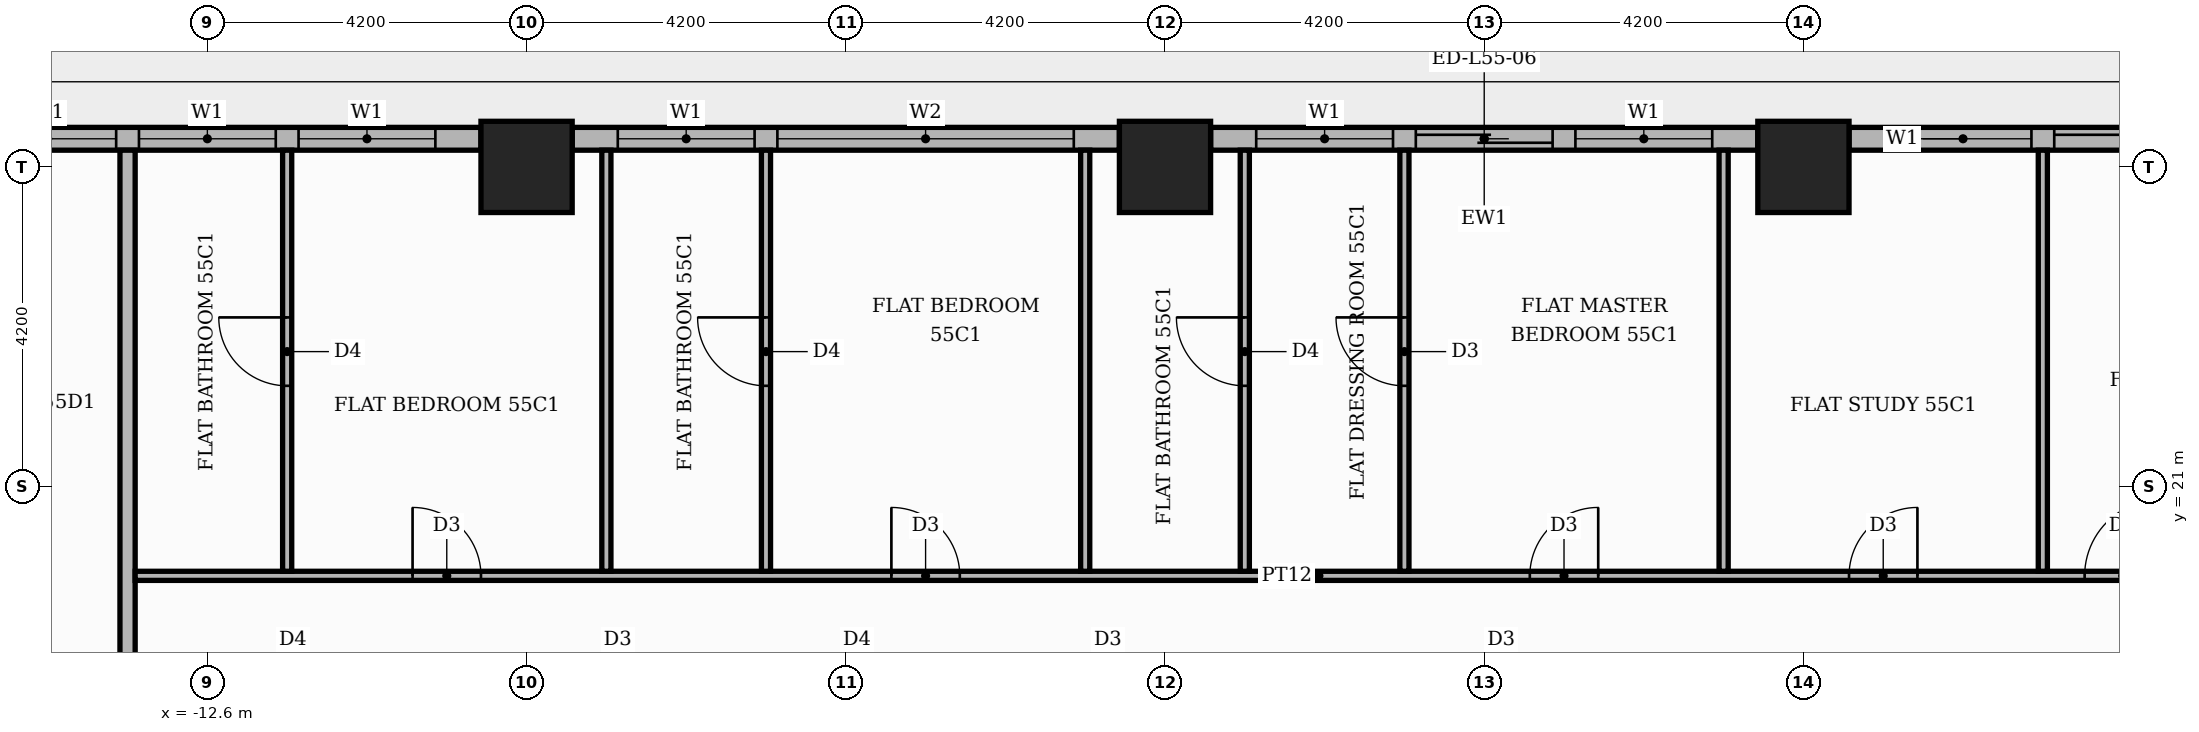
"""IFC4 building model, lengths in metres.
Left out: names, types, materials, properties, quantities, classifications, styles, units other than length and angle.
Written with IfcOpenShell. Run it as: python <this file> out.ifc"""

import sys

from ifc_helpers import new_model, si_unit, direction, frame, frame_2d, origin, origin_2d, place, context, subcontext, project, spatial, rectangle, extrude, element, fill, save


model = new_model("IFC4")
c1 = context("Model", 3, precision=1e-05, world=origin(), true_north=direction((0.0, 1.0)))
c2 = subcontext(c1, "Body", "Model", "MODEL_VIEW")
j1 = project(units=[si_unit("LENGTHUNIT", "METRE"), si_unit("PLANEANGLEUNIT", "RADIAN")], contexts=[c1])
p1 = place(None, origin())
s1 = spatial("IfcSite", under=j1, at=p1, CompositionType="ELEMENT")
p2 = place(p1, origin())
s2 = spatial("IfcBuilding", under=s1, at=p2, CompositionType="ELEMENT")
p3 = place(p2, frame((0.0, 0.0, 231.3)))
s3 = spatial("IfcBuildingStorey", under=s2, at=p3, CompositionType="ELEMENT", Elevation=231.3)
for number, where, z_axis, x_axis in (
    (1, (0.0, 25.2, 0.0), (0.0, 0.0, 1.0), (1.0, 0.0, 0.0)),
    (2, (-8.4, 25.2, 0.0), (0.0, 0.0, 1.0), (1.0, 0.0, 0.0)),
    (3, (8.4, 25.2, 0.0), (0.0, 0.0, 1.0), (1.0, 0.0, 0.0)),
):
    element("IfcColumn", number, at=place(p3, frame(where, z_axis=z_axis, x_axis=x_axis)), inside=s3, PredefinedType="COLUMN", context=c2, shape_type="SweptSolid", body=[
        extrude(rectangle(XDim=1.2, YDim=1.2, at=origin_2d()), origin(), (0.0, 0.0, 1.0), 3.9),
    ])
p4 = place(p3, frame((16.2, 25.57, 0.0), z_axis=(0.0, 0.0, 1.0), x_axis=(-1.0, 0.0, 0.0)))
e4 = element("IfcWall", 4, at=p4, inside=s3, PredefinedType="STANDARD", context=c2, shape_type="SweptSolid", body=[
    extrude(rectangle(XDim=7.2, YDim=0.3, at=frame_2d((3.6, 0.0))), origin(), (0.0, 0.0, 1.0), 3.4),
])
p5 = place(p4, frame((0.6, 0.0, 0.0)))
e5 = element("IfcOpeningElement", 5, at=p5, cuts=e4, PredefinedType="OPENING", context=c2, shape_type="SweptSolid", body=[
    extrude(rectangle(XDim=3.9, YDim=2.4, at=frame_2d((1.95, 1.2))), frame((0.0, 0.16, 0.0), z_axis=(0.0, -1.0, 0.0), x_axis=(1.0, 0.0, 0.0)), (0.0, 0.0, 1.0), 0.32),
])
p6 = place(p4, frame((4.8, 0.0, 0.9)))
e6 = element("IfcOpeningElement", 6, at=p6, cuts=e4, PredefinedType="OPENING", context=c2, shape_type="SweptSolid", body=[
    extrude(rectangle(XDim=1.8, YDim=2.1, at=frame_2d((0.9, 1.05))), frame((0.0, 0.16, 0.0), z_axis=(0.0, -1.0, 0.0), x_axis=(1.0, 0.0, 0.0)), (0.0, 0.0, 1.0), 0.32),
])
p7 = place(p3, frame((7.8, 25.57, 0.0), z_axis=(0.0, 0.0, 1.0), x_axis=(-1.0, 0.0, 0.0)))
e7 = element("IfcWall", 7, at=p7, inside=s3, PredefinedType="STANDARD", context=c2, shape_type="SweptSolid", body=[
    extrude(rectangle(XDim=7.2, YDim=0.3, at=frame_2d((3.6, 0.0))), origin(), (0.0, 0.0, 1.0), 3.4),
])
p8 = place(p7, frame((0.6, 0.0, 0.9)))
e8 = element("IfcOpeningElement", 8, at=p8, cuts=e7, PredefinedType="OPENING", context=c2, shape_type="SweptSolid", body=[
    extrude(rectangle(XDim=1.8, YDim=2.1, at=frame_2d((0.9, 1.05))), frame((0.0, 0.16, 0.0), z_axis=(0.0, -1.0, 0.0), x_axis=(1.0, 0.0, 0.0)), (0.0, 0.0, 1.0), 0.32),
])
p9 = place(p7, frame((2.7, 0.0, 0.0)))
e9 = element("IfcOpeningElement", 9, at=p9, cuts=e7, PredefinedType="OPENING", context=c2, shape_type="SweptSolid", body=[
    extrude(rectangle(XDim=1.8, YDim=2.4, at=frame_2d((0.9, 1.2))), frame((0.0, 0.16, 0.0), z_axis=(0.0, -1.0, 0.0), x_axis=(1.0, 0.0, 0.0)), (0.0, 0.0, 1.0), 0.32),
])
p10 = place(p7, frame((4.8, 0.0, 0.9)))
e10 = element("IfcOpeningElement", 10, at=p10, cuts=e7, PredefinedType="OPENING", context=c2, shape_type="SweptSolid", body=[
    extrude(rectangle(XDim=1.8, YDim=2.1, at=frame_2d((0.9, 1.05))), frame((0.0, 0.16, 0.0), z_axis=(0.0, -1.0, 0.0), x_axis=(1.0, 0.0, 0.0)), (0.0, 0.0, 1.0), 0.32),
])
p11 = place(p3, frame((-0.6, 25.57, 0.0), z_axis=(0.0, 0.0, 1.0), x_axis=(-1.0, 0.0, 0.0)))
e11 = element("IfcWall", 11, at=p11, inside=s3, PredefinedType="STANDARD", context=c2, shape_type="SweptSolid", body=[
    extrude(rectangle(XDim=7.2, YDim=0.3, at=frame_2d((3.6, 0.0))), origin(), (0.0, 0.0, 1.0), 3.4),
])
p12 = place(p11, frame((0.6, 0.0, 0.9)))
e12 = element("IfcOpeningElement", 12, at=p12, cuts=e11, PredefinedType="OPENING", context=c2, shape_type="SweptSolid", body=[
    extrude(rectangle(XDim=3.9, YDim=2.1, at=frame_2d((1.95, 1.05))), frame((0.0, 0.16, 0.0), z_axis=(0.0, -1.0, 0.0), x_axis=(1.0, 0.0, 0.0)), (0.0, 0.0, 1.0), 0.32),
])
p13 = place(p11, frame((4.8, 0.0, 0.9)))
e13 = element("IfcOpeningElement", 13, at=p13, cuts=e11, PredefinedType="OPENING", context=c2, shape_type="SweptSolid", body=[
    extrude(rectangle(XDim=1.8, YDim=2.1, at=frame_2d((0.9, 1.05))), frame((0.0, 0.16, 0.0), z_axis=(0.0, -1.0, 0.0), x_axis=(1.0, 0.0, 0.0)), (0.0, 0.0, 1.0), 0.32),
])
p14 = place(p3, frame((-9.0, 25.57, 0.0), z_axis=(0.0, 0.0, 1.0), x_axis=(-1.0, 0.0, 0.0)))
e14 = element("IfcWall", 14, at=p14, inside=s3, PredefinedType="STANDARD", context=c2, shape_type="SweptSolid", body=[
    extrude(rectangle(XDim=7.2, YDim=0.3, at=frame_2d((3.6, 0.0))), origin(), (0.0, 0.0, 1.0), 3.4),
])
p15 = place(p14, frame((0.6, 0.0, 0.9)))
e15 = element("IfcOpeningElement", 15, at=p15, cuts=e14, PredefinedType="OPENING", context=c2, shape_type="SweptSolid", body=[
    extrude(rectangle(XDim=1.8, YDim=2.1, at=frame_2d((0.9, 1.05))), frame((0.0, 0.16, 0.0), z_axis=(0.0, -1.0, 0.0), x_axis=(1.0, 0.0, 0.0)), (0.0, 0.0, 1.0), 0.32),
])
p16 = place(p14, frame((2.7, 0.0, 0.9)))
e16 = element("IfcOpeningElement", 16, at=p16, cuts=e14, PredefinedType="OPENING", context=c2, shape_type="SweptSolid", body=[
    extrude(rectangle(XDim=1.8, YDim=2.1, at=frame_2d((0.9, 1.05))), frame((0.0, 0.16, 0.0), z_axis=(0.0, -1.0, 0.0), x_axis=(1.0, 0.0, 0.0)), (0.0, 0.0, 1.0), 0.32),
])
p17 = place(p14, frame((4.8, 0.0, 0.9)))
e17 = element("IfcOpeningElement", 17, at=p17, cuts=e14, PredefinedType="OPENING", context=c2, shape_type="SweptSolid", body=[
    extrude(rectangle(XDim=1.8, YDim=2.1, at=frame_2d((0.9, 1.05))), frame((0.0, 0.16, 0.0), z_axis=(0.0, -1.0, 0.0), x_axis=(1.0, 0.0, 0.0)), (0.0, 0.0, 1.0), 0.32),
])
p18 = place(p3, frame((-13.65, 13.75, 0.0), z_axis=(0.0, 0.0, 1.0), x_axis=(0.0, 1.0, 0.0)))
e18 = element("IfcWall", 18, at=p18, inside=s3, PredefinedType="PARTITIONING", context=c2, shape_type="SweptSolid", body=[
    extrude(rectangle(XDim=11.67, YDim=0.2, at=frame_2d((5.835, 0.0))), origin(), (0.0, 0.0, 1.0), 3.4),
])
p19 = place(p3, frame((-13.55, 19.82, 0.0), z_axis=(0.0, 0.0, 1.0), x_axis=(1.0, 0.0, 0.0)))
e19 = element("IfcWall", 19, at=p19, inside=s3, PredefinedType="PARTITIONING", context=c2, shape_type="SweptSolid", body=[
    extrude(rectangle(XDim=31.15, YDim=0.12, at=frame_2d((15.575, 0.0))), origin(), (0.0, 0.0, 1.0), 3.4),
])
p20 = place(p19, frame((25.65, 0.0, 0.0)))
e20 = element("IfcOpeningElement", 20, at=p20, cuts=e19, PredefinedType="OPENING", context=c2, shape_type="SweptSolid", body=[
    extrude(rectangle(XDim=1.0, YDim=2.1, at=frame_2d((0.5, 1.05))), frame((0.0, 0.07, 0.0), z_axis=(0.0, -1.0, 0.0), x_axis=(1.0, 0.0, 0.0)), (0.0, 0.0, 1.0), 0.14),
])
p21 = place(p19, frame((22.55, 0.0, 0.0)))
e21 = element("IfcOpeningElement", 21, at=p21, cuts=e19, PredefinedType="OPENING", context=c2, shape_type="SweptSolid", body=[
    extrude(rectangle(XDim=0.9, YDim=2.1, at=frame_2d((0.45, 1.05))), frame((0.0, 0.07, 0.0), z_axis=(0.0, -1.0, 0.0), x_axis=(1.0, 0.0, 0.0)), (0.0, 0.0, 1.0), 0.14),
])
p22 = place(p19, frame((18.35, 0.0, 0.0)))
e22 = element("IfcOpeningElement", 22, at=p22, cuts=e19, PredefinedType="OPENING", context=c2, shape_type="SweptSolid", body=[
    extrude(rectangle(XDim=0.9, YDim=2.1, at=frame_2d((0.45, 1.05))), frame((0.0, 0.07, 0.0), z_axis=(0.0, -1.0, 0.0), x_axis=(1.0, 0.0, 0.0)), (0.0, 0.0, 1.0), 0.14),
])
p23 = place(p19, frame((9.95, 0.0, 0.0)))
e23 = element("IfcOpeningElement", 23, at=p23, cuts=e19, PredefinedType="OPENING", context=c2, shape_type="SweptSolid", body=[
    extrude(rectangle(XDim=0.9, YDim=2.1, at=frame_2d((0.45, 1.05))), frame((0.0, 0.07, 0.0), z_axis=(0.0, -1.0, 0.0), x_axis=(1.0, 0.0, 0.0)), (0.0, 0.0, 1.0), 0.14),
])
p24 = place(p19, frame((3.65, 0.0, 0.0)))
e24 = element("IfcOpeningElement", 24, at=p24, cuts=e19, PredefinedType="OPENING", context=c2, shape_type="SweptSolid", body=[
    extrude(rectangle(XDim=0.9, YDim=2.1, at=frame_2d((0.45, 1.05))), frame((0.0, 0.07, 0.0), z_axis=(0.0, -1.0, 0.0), x_axis=(1.0, 0.0, 0.0)), (0.0, 0.0, 1.0), 0.14),
])
p25 = place(p3, frame((-11.55, 19.88, 0.0), z_axis=(0.0, 0.0, 1.0), x_axis=(0.0, 1.0, 0.0)))
e25 = element("IfcWall", 25, at=p25, inside=s3, PredefinedType="PARTITIONING", context=c2, shape_type="SweptSolid", body=[
    extrude(rectangle(XDim=5.54, YDim=0.12, at=frame_2d((2.77, 0.0))), origin(), (0.0, 0.0, 1.0), 3.4),
])
p26 = place(p25, frame((2.44, 0.0, 0.0)))
e26 = element("IfcOpeningElement", 26, at=p26, cuts=e25, PredefinedType="OPENING", context=c2, shape_type="SweptSolid", body=[
    extrude(rectangle(XDim=0.9, YDim=2.1, at=frame_2d((0.45, 1.05))), frame((0.0, 0.07, 0.0), z_axis=(0.0, -1.0, 0.0), x_axis=(1.0, 0.0, 0.0)), (0.0, 0.0, 1.0), 0.14),
])
p27 = place(p3, frame((-7.35, 19.88, 0.0), z_axis=(0.0, 0.0, 1.0), x_axis=(0.0, 1.0, 0.0)))
e27 = element("IfcWall", 27, at=p27, inside=s3, PredefinedType="PARTITIONING", context=c2, shape_type="SweptSolid", body=[
    extrude(rectangle(XDim=5.54, YDim=0.12, at=frame_2d((2.77, 0.0))), origin(), (0.0, 0.0, 1.0), 3.4),
])
p28 = place(p3, frame((-5.25, 19.88, 0.0), z_axis=(0.0, 0.0, 1.0), x_axis=(0.0, 1.0, 0.0)))
e28 = element("IfcWall", 28, at=p28, inside=s3, PredefinedType="PARTITIONING", context=c2, shape_type="SweptSolid", body=[
    extrude(rectangle(XDim=5.54, YDim=0.12, at=frame_2d((2.77, 0.0))), origin(), (0.0, 0.0, 1.0), 3.4),
])
p29 = place(p28, frame((2.44, 0.0, 0.0)))
e29 = element("IfcOpeningElement", 29, at=p29, cuts=e28, PredefinedType="OPENING", context=c2, shape_type="SweptSolid", body=[
    extrude(rectangle(XDim=0.9, YDim=2.1, at=frame_2d((0.45, 1.05))), frame((0.0, 0.07, 0.0), z_axis=(0.0, -1.0, 0.0), x_axis=(1.0, 0.0, 0.0)), (0.0, 0.0, 1.0), 0.14),
])
p30 = place(p3, frame((-1.05, 19.88, 0.0), z_axis=(0.0, 0.0, 1.0), x_axis=(0.0, 1.0, 0.0)))
e30 = element("IfcWall", 30, at=p30, inside=s3, PredefinedType="PARTITIONING", context=c2, shape_type="SweptSolid", body=[
    extrude(rectangle(XDim=5.54, YDim=0.12, at=frame_2d((2.77, 0.0))), origin(), (0.0, 0.0, 1.0), 3.4),
])
p31 = place(p3, frame((1.05, 19.88, 0.0), z_axis=(0.0, 0.0, 1.0), x_axis=(0.0, 1.0, 0.0)))
e31 = element("IfcWall", 31, at=p31, inside=s3, PredefinedType="PARTITIONING", context=c2, shape_type="SweptSolid", body=[
    extrude(rectangle(XDim=5.54, YDim=0.12, at=frame_2d((2.77, 0.0))), origin(), (0.0, 0.0, 1.0), 3.4),
])
p32 = place(p31, frame((2.44, 0.0, 0.0)))
e32 = element("IfcOpeningElement", 32, at=p32, cuts=e31, PredefinedType="OPENING", context=c2, shape_type="SweptSolid", body=[
    extrude(rectangle(XDim=0.9, YDim=2.1, at=frame_2d((0.45, 1.05))), frame((0.0, 0.07, 0.0), z_axis=(0.0, -1.0, 0.0), x_axis=(1.0, 0.0, 0.0)), (0.0, 0.0, 1.0), 0.14),
])
p33 = place(p3, frame((3.15, 19.88, 0.0), z_axis=(0.0, 0.0, 1.0), x_axis=(0.0, 1.0, 0.0)))
e33 = element("IfcWall", 33, at=p33, inside=s3, PredefinedType="PARTITIONING", context=c2, shape_type="SweptSolid", body=[
    extrude(rectangle(XDim=5.54, YDim=0.12, at=frame_2d((2.77, 0.0))), origin(), (0.0, 0.0, 1.0), 3.4),
])
p34 = place(p33, frame((2.44, 0.0, 0.0)))
e34 = element("IfcOpeningElement", 34, at=p34, cuts=e33, PredefinedType="OPENING", context=c2, shape_type="SweptSolid", body=[
    extrude(rectangle(XDim=0.9, YDim=2.1, at=frame_2d((0.45, 1.05))), frame((0.0, 0.07, 0.0), z_axis=(0.0, -1.0, 0.0), x_axis=(1.0, 0.0, 0.0)), (0.0, 0.0, 1.0), 0.14),
])
for number, where, z_axis, x_axis in (
    (35, (7.35, 19.88, 0.0), (0.0, 0.0, 1.0), (0.0, 1.0, 0.0)),
    (36, (11.55, 19.88, 0.0), (0.0, 0.0, 1.0), (0.0, 1.0, 0.0)),
):
    element("IfcWall", number, at=place(p3, frame(where, z_axis=z_axis, x_axis=x_axis)), inside=s3, PredefinedType="PARTITIONING", context=c2, shape_type="SweptSolid", body=[
        extrude(rectangle(XDim=5.54, YDim=0.12, at=frame_2d((2.77, 0.0))), origin(), (0.0, 0.0, 1.0), 3.4),
    ])
p35 = place(p5, origin())
e37 = element("IfcDoor", 37, at=p35, inside=s3, OperationType="SLIDING_TO_LEFT", PredefinedType="DOOR", context=c2, shape_type="SweptSolid", body=[
    extrude(rectangle(XDim=3.9, YDim=2.4, at=frame_2d((1.95, 1.2))), frame((0.0, 0.025, 0.0), z_axis=(0.0, -1.0, 0.0), x_axis=(1.0, 0.0, 0.0)), (0.0, 0.0, 1.0), 0.05),
])
fill(e5, e37)
p36 = place(p6, origin())
e38 = element("IfcWindow", 38, at=p36, inside=s3, PartitioningType="SINGLE_PANEL", PredefinedType="WINDOW", context=c2, shape_type="SweptSolid", body=[
    extrude(rectangle(XDim=1.8, YDim=2.1, at=frame_2d((0.9, 1.05))), frame((0.0, 0.03, 0.0), z_axis=(0.0, -1.0, 0.0), x_axis=(1.0, 0.0, 0.0)), (0.0, 0.0, 1.0), 0.06),
])
fill(e6, e38)
p37 = place(p8, origin())
e39 = element("IfcWindow", 39, at=p37, inside=s3, PartitioningType="SINGLE_PANEL", PredefinedType="WINDOW", context=c2, shape_type="SweptSolid", body=[
    extrude(rectangle(XDim=1.8, YDim=2.1, at=frame_2d((0.9, 1.05))), frame((0.0, 0.03, 0.0), z_axis=(0.0, -1.0, 0.0), x_axis=(1.0, 0.0, 0.0)), (0.0, 0.0, 1.0), 0.06),
])
fill(e8, e39)
p38 = place(p9, origin())
e40 = element("IfcDoor", 40, at=p38, inside=s3, OperationType="SLIDING_TO_LEFT", PredefinedType="DOOR", context=c2, shape_type="SweptSolid", body=[
    extrude(rectangle(XDim=1.8, YDim=2.4, at=frame_2d((0.9, 1.2))), frame((0.0, 0.025, 0.0), z_axis=(0.0, -1.0, 0.0), x_axis=(1.0, 0.0, 0.0)), (0.0, 0.0, 1.0), 0.05),
])
fill(e9, e40)
p39 = place(p10, origin())
e41 = element("IfcWindow", 41, at=p39, inside=s3, PartitioningType="SINGLE_PANEL", PredefinedType="WINDOW", context=c2, shape_type="SweptSolid", body=[
    extrude(rectangle(XDim=1.8, YDim=2.1, at=frame_2d((0.9, 1.05))), frame((0.0, 0.03, 0.0), z_axis=(0.0, -1.0, 0.0), x_axis=(1.0, 0.0, 0.0)), (0.0, 0.0, 1.0), 0.06),
])
fill(e10, e41)
p40 = place(p12, origin())
e42 = element("IfcWindow", 42, at=p40, inside=s3, PartitioningType="SINGLE_PANEL", PredefinedType="WINDOW", context=c2, shape_type="SweptSolid", body=[
    extrude(rectangle(XDim=3.9, YDim=2.1, at=frame_2d((1.95, 1.05))), frame((0.0, 0.03, 0.0), z_axis=(0.0, -1.0, 0.0), x_axis=(1.0, 0.0, 0.0)), (0.0, 0.0, 1.0), 0.06),
])
fill(e12, e42)
p41 = place(p13, origin())
e43 = element("IfcWindow", 43, at=p41, inside=s3, PartitioningType="SINGLE_PANEL", PredefinedType="WINDOW", context=c2, shape_type="SweptSolid", body=[
    extrude(rectangle(XDim=1.8, YDim=2.1, at=frame_2d((0.9, 1.05))), frame((0.0, 0.03, 0.0), z_axis=(0.0, -1.0, 0.0), x_axis=(1.0, 0.0, 0.0)), (0.0, 0.0, 1.0), 0.06),
])
fill(e13, e43)
p42 = place(p15, origin())
e44 = element("IfcWindow", 44, at=p42, inside=s3, PartitioningType="SINGLE_PANEL", PredefinedType="WINDOW", context=c2, shape_type="SweptSolid", body=[
    extrude(rectangle(XDim=1.8, YDim=2.1, at=frame_2d((0.9, 1.05))), frame((0.0, 0.03, 0.0), z_axis=(0.0, -1.0, 0.0), x_axis=(1.0, 0.0, 0.0)), (0.0, 0.0, 1.0), 0.06),
])
fill(e15, e44)
p43 = place(p16, origin())
e45 = element("IfcWindow", 45, at=p43, inside=s3, PartitioningType="SINGLE_PANEL", PredefinedType="WINDOW", context=c2, shape_type="SweptSolid", body=[
    extrude(rectangle(XDim=1.8, YDim=2.1, at=frame_2d((0.9, 1.05))), frame((0.0, 0.03, 0.0), z_axis=(0.0, -1.0, 0.0), x_axis=(1.0, 0.0, 0.0)), (0.0, 0.0, 1.0), 0.06),
])
fill(e16, e45)
p44 = place(p17, origin())
e46 = element("IfcWindow", 46, at=p44, inside=s3, PartitioningType="SINGLE_PANEL", PredefinedType="WINDOW", context=c2, shape_type="SweptSolid", body=[
    extrude(rectangle(XDim=1.8, YDim=2.1, at=frame_2d((0.9, 1.05))), frame((0.0, 0.03, 0.0), z_axis=(0.0, -1.0, 0.0), x_axis=(1.0, 0.0, 0.0)), (0.0, 0.0, 1.0), 0.06),
])
fill(e17, e46)
p45 = place(p20, origin())
e47 = element("IfcDoor", 47, at=p45, inside=s3, OperationType="SINGLE_SWING_RIGHT", PredefinedType="DOOR", context=c2, shape_type="SweptSolid", body=[
    extrude(rectangle(XDim=1.0, YDim=2.1, at=frame_2d((0.5, 1.05))), frame((0.0, 0.025, 0.0), z_axis=(0.0, -1.0, 0.0), x_axis=(1.0, 0.0, 0.0)), (0.0, 0.0, 1.0), 0.05),
])
fill(e20, e47)
p46 = place(p21, origin())
e48 = element("IfcDoor", 48, at=p46, inside=s3, OperationType="SINGLE_SWING_RIGHT", PredefinedType="DOOR", context=c2, shape_type="SweptSolid", body=[
    extrude(rectangle(XDim=0.9, YDim=2.1, at=frame_2d((0.45, 1.05))), frame((0.0, 0.025, 0.0), z_axis=(0.0, -1.0, 0.0), x_axis=(1.0, 0.0, 0.0)), (0.0, 0.0, 1.0), 0.05),
])
fill(e21, e48)
p47 = place(p22, origin())
e49 = element("IfcDoor", 49, at=p47, inside=s3, OperationType="SINGLE_SWING_RIGHT", PredefinedType="DOOR", context=c2, shape_type="SweptSolid", body=[
    extrude(rectangle(XDim=0.9, YDim=2.1, at=frame_2d((0.45, 1.05))), frame((0.0, 0.025, 0.0), z_axis=(0.0, -1.0, 0.0), x_axis=(1.0, 0.0, 0.0)), (0.0, 0.0, 1.0), 0.05),
])
fill(e22, e49)
p48 = place(p34, origin())
e50 = element("IfcDoor", 50, at=p48, inside=s3, OperationType="SINGLE_SWING_RIGHT", PredefinedType="DOOR", context=c2, shape_type="SweptSolid", body=[
    extrude(rectangle(XDim=0.9, YDim=2.1, at=frame_2d((0.45, 1.05))), frame((0.0, 0.025, 0.0), z_axis=(0.0, -1.0, 0.0), x_axis=(1.0, 0.0, 0.0)), (0.0, 0.0, 1.0), 0.05),
])
fill(e34, e50)
p49 = place(p32, origin())
e51 = element("IfcDoor", 51, at=p49, inside=s3, OperationType="SINGLE_SWING_RIGHT", PredefinedType="DOOR", context=c2, shape_type="SweptSolid", body=[
    extrude(rectangle(XDim=0.9, YDim=2.1, at=frame_2d((0.45, 1.05))), frame((0.0, 0.025, 0.0), z_axis=(0.0, -1.0, 0.0), x_axis=(1.0, 0.0, 0.0)), (0.0, 0.0, 1.0), 0.05),
])
fill(e32, e51)
p50 = place(p23, origin())
e52 = element("IfcDoor", 52, at=p50, inside=s3, OperationType="SINGLE_SWING_LEFT", PredefinedType="DOOR", context=c2, shape_type="SweptSolid", body=[
    extrude(rectangle(XDim=0.9, YDim=2.1, at=frame_2d((0.45, 1.05))), frame((0.0, 0.025, 0.0), z_axis=(0.0, -1.0, 0.0), x_axis=(1.0, 0.0, 0.0)), (0.0, 0.0, 1.0), 0.05),
])
fill(e23, e52)
p51 = place(p29, origin())
e53 = element("IfcDoor", 53, at=p51, inside=s3, OperationType="SINGLE_SWING_RIGHT", PredefinedType="DOOR", context=c2, shape_type="SweptSolid", body=[
    extrude(rectangle(XDim=0.9, YDim=2.1, at=frame_2d((0.45, 1.05))), frame((0.0, 0.025, 0.0), z_axis=(0.0, -1.0, 0.0), x_axis=(1.0, 0.0, 0.0)), (0.0, 0.0, 1.0), 0.05),
])
fill(e29, e53)
p52 = place(p24, origin())
e54 = element("IfcDoor", 54, at=p52, inside=s3, OperationType="SINGLE_SWING_LEFT", PredefinedType="DOOR", context=c2, shape_type="SweptSolid", body=[
    extrude(rectangle(XDim=0.9, YDim=2.1, at=frame_2d((0.45, 1.05))), frame((0.0, 0.025, 0.0), z_axis=(0.0, -1.0, 0.0), x_axis=(1.0, 0.0, 0.0)), (0.0, 0.0, 1.0), 0.05),
])
fill(e24, e54)
p53 = place(p26, origin())
e55 = element("IfcDoor", 55, at=p53, inside=s3, OperationType="SINGLE_SWING_RIGHT", PredefinedType="DOOR", context=c2, shape_type="SweptSolid", body=[
    extrude(rectangle(XDim=0.9, YDim=2.1, at=frame_2d((0.45, 1.05))), frame((0.0, 0.025, 0.0), z_axis=(0.0, -1.0, 0.0), x_axis=(1.0, 0.0, 0.0)), (0.0, 0.0, 1.0), 0.05),
])
fill(e26, e55)
save(model, sys.argv[1])
